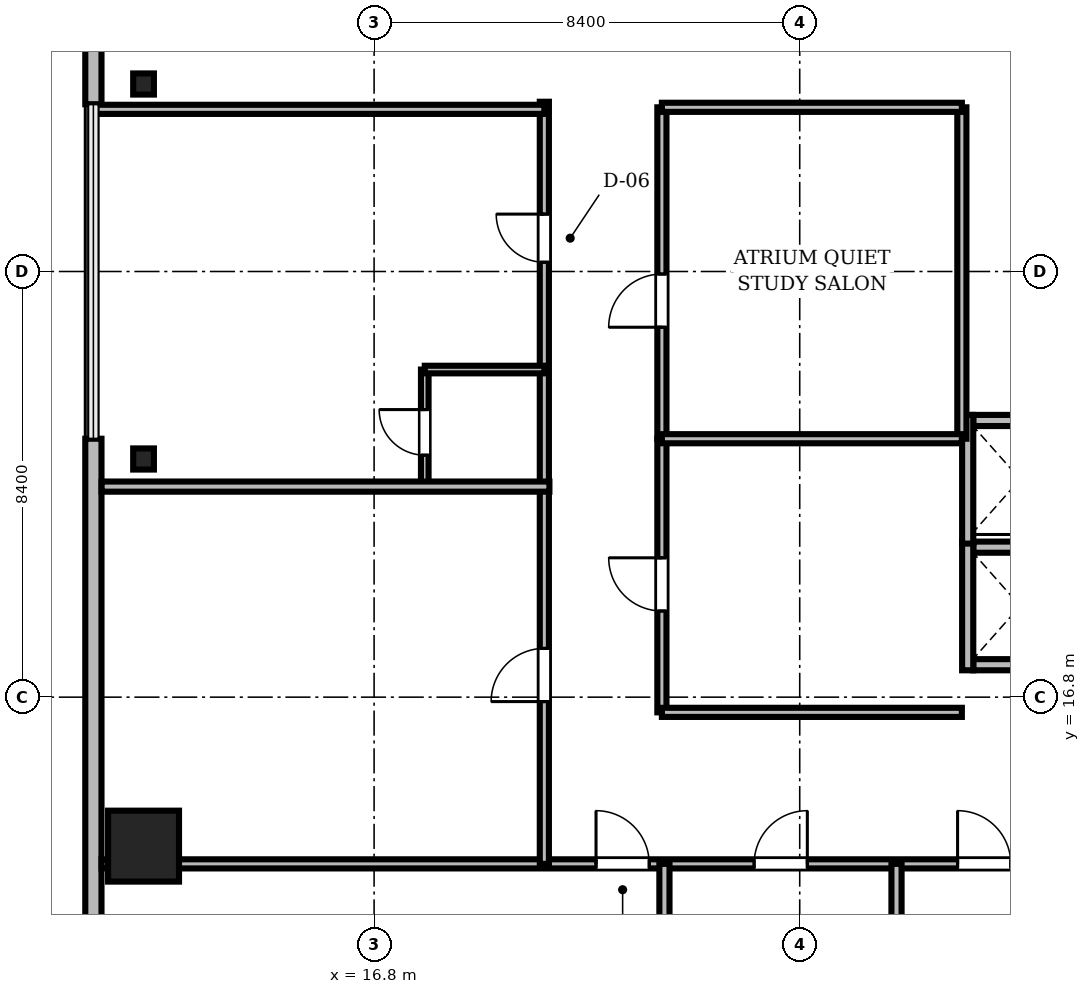
"""IFC4 building model, lengths in metres.
Left out: names, types, materials, properties, quantities, classifications, styles, units other than length and angle.
Written with IfcOpenShell. Run it as: python <this file> out.ifc"""

import sys

from ifc_helpers import new_model, si_unit, direction, frame, frame_2d, origin, origin_2d, place, context, subcontext, project, spatial, rectangle, i_section, extrude, source, transform, mapped, element, fill, save


model = new_model("IFC4")
c1 = context("Model", 3, precision=1e-05, world=origin(), true_north=direction((0.0, 1.0)))
c2 = subcontext(c1, "Body", "Model", "MODEL_VIEW")
j1 = project(units=[si_unit("LENGTHUNIT", "METRE"), si_unit("PLANEANGLEUNIT", "RADIAN")], contexts=[c1])
p1 = place(None, origin())
s1 = spatial("IfcSite", under=j1, at=p1, CompositionType="ELEMENT")
p2 = place(p1, origin())
s2 = spatial("IfcBuilding", under=s1, at=p2, CompositionType="ELEMENT")
p3 = place(p2, frame((0.0, 0.0, 181.0)))
s3 = spatial("IfcBuildingStorey", under=s2, at=p3, CompositionType="ELEMENT", Elevation=181.0)
m1 = source(origin(), c2, "Body", "SweptSolid", [
    extrude(rectangle(XDim=1.4, YDim=1.4, at=origin_2d()), origin(), (0.0, 0.0, 1.0), 3.58),
])
p4 = place(p3, frame((12.25, 13.86, 0.0), z_axis=(0.0, 0.0, 1.0), x_axis=(1.0, 0.0, 0.0)))
e1 = element("IfcColumn", 1, at=p4, inside=s3, PredefinedType="COLUMN", context=c2, shape_type="MappedRepresentation", body=[
    mapped(m1, transform((0.0, 0.0, 0.0), scale=1.0)),
])
m2 = source(origin(), c2, "Body", "SweptSolid", [
    extrude(i_section(OverallWidth=0.409, OverallDepth=0.417, WebThickness=0.021, FlangeThickness=0.033, FilletRadius=0.015, at=origin_2d()), origin(), (0.0, 0.0, 1.0), 3.58),
])
for number, where, z_axis, x_axis in (
    (2, (12.25, 28.9, 0.0), (0.0, 0.0, 1.0), (1.0, 0.0, 0.0)),
    (3, (12.25, 21.5, 0.0), (0.0, 0.0, 1.0), (1.0, 0.0, 0.0)),
):
    element("IfcColumn", number, at=place(p3, frame(where, z_axis=z_axis, x_axis=x_axis)), inside=s3, PredefinedType="COLUMN", context=c2, shape_type="MappedRepresentation", body=[
        mapped(m2, transform((0.0, 0.0, 0.0), scale=1.0)),
    ])
m3 = source(origin(), c2, "Body", "SweptSolid", [
    extrude(rectangle(XDim=15.6, YDim=0.32, at=frame_2d((7.8, 0.0))), origin(), (0.0, 0.0, 1.0), 3.58),
])
p5 = place(p3, frame((11.26, 44.1, 0.0), z_axis=(0.0, 0.0, 1.0), x_axis=(0.0, -1.0, 0.0)))
e4 = element("IfcWall", 4, at=p5, inside=s3, PredefinedType="SOLIDWALL", context=c2, shape_type="MappedRepresentation", body=[
    mapped(m3, transform((0.0, 0.0, 0.0), scale=1.0)),
])
m4 = source(origin(), c2, "Body", "SweptSolid", [
    extrude(rectangle(XDim=1.4, YDim=2.3, at=frame_2d((0.7, 1.15))), frame((0.0, 0.17, 0.0), z_axis=(0.0, -1.0, 0.0), x_axis=(1.0, 0.0, 0.0)), (0.0, 0.0, 1.0), 0.34),
])
p6 = place(p5, frame((9.61, 0.0, 0.0)))
e5 = element("IfcOpeningElement", 5, at=p6, cuts=e4, PredefinedType="OPENING", context=c2, shape_type="MappedRepresentation", body=[
    mapped(m4, transform((0.0, 0.0, 0.0), scale=1.0)),
])
m5 = source(origin(), c2, "Body", "SweptSolid", [
    extrude(rectangle(XDim=2.8, YDim=2.4, at=frame_2d((1.4, 1.2))), frame((0.0, 0.17, 0.0), z_axis=(0.0, -1.0, 0.0), x_axis=(1.0, 0.0, 0.0)), (0.0, 0.0, 1.0), 0.34),
])
p7 = place(p5, frame((2.705, 0.0, 0.72)))
e6 = element("IfcOpeningElement", 6, at=p7, cuts=e4, PredefinedType="OPENING", context=c2, shape_type="MappedRepresentation", body=[
    mapped(m5, transform((0.0, 0.0, 0.0), scale=1.0)),
])
m6 = source(origin(), c2, "Body", "SweptSolid", [
    extrude(rectangle(XDim=15.6, YDim=0.32, at=frame_2d((7.8, 0.0))), origin(), (0.0, 0.0, 1.0), 3.58),
])
p8 = place(p3, frame((11.26, 21.9, 0.0), z_axis=(0.0, 0.0, 1.0), x_axis=(0.0, -1.0, 0.0)))
e7 = element("IfcWall", 7, at=p8, inside=s3, PredefinedType="SOLIDWALL", context=c2, shape_type="MappedRepresentation", body=[
    mapped(m6, transform((0.0, 0.0, 0.0), scale=1.0)),
])
p9 = place(p8, frame((10.095, 0.0, 0.72)))
e8 = element("IfcOpeningElement", 8, at=p9, cuts=e7, PredefinedType="OPENING", context=c2, shape_type="MappedRepresentation", body=[
    mapped(m5, transform((0.0, 0.0, 0.0), scale=1.0)),
])
m7 = source(origin(), c2, "Body", "SweptSolid", [
    extrude(rectangle(XDim=1.85, YDim=0.22, at=frame_2d((0.925, 0.0))), origin(), (0.0, 0.0, 1.0), 3.022),
])
p10 = place(p3, frame((28.625, 17.44, 0.0), z_axis=(0.0, 0.0, 1.0), x_axis=(1.0, 0.0, 0.0)))
e9 = element("IfcWall", 9, at=p10, inside=s3, PredefinedType="SOLIDWALL", context=c2, shape_type="MappedRepresentation", body=[
    mapped(m7, transform((0.0, 0.0, 0.0), scale=1.0)),
])
m8 = source(origin(), c2, "Body", "SweptSolid", [
    extrude(rectangle(XDim=1.85, YDim=0.22, at=frame_2d((0.925, 0.0))), origin(), (0.0, 0.0, 1.0), 3.58),
])
p11 = place(p3, frame((28.625, 19.76, 0.0), z_axis=(0.0, 0.0, 1.0), x_axis=(1.0, 0.0, 0.0)))
e10 = element("IfcWall", 10, at=p11, inside=s3, PredefinedType="SOLIDWALL", context=c2, shape_type="MappedRepresentation", body=[
    mapped(m8, transform((0.0, 0.0, 0.0), scale=1.0)),
])
m9 = source(origin(), c2, "Body", "SweptSolid", [
    extrude(rectangle(XDim=2.54, YDim=0.22, at=frame_2d((1.27, 0.0))), origin(), (0.0, 0.0, 1.0), 3.022),
])
p12 = place(p3, frame((28.515, 17.33, 0.0), z_axis=(0.0, 0.0, 1.0), x_axis=(0.0, 1.0, 0.0)))
e11 = element("IfcWall", 11, at=p12, inside=s3, PredefinedType="SOLIDWALL", context=c2, shape_type="MappedRepresentation", body=[
    mapped(m9, transform((0.0, 0.0, 0.0), scale=1.0)),
])
p13 = place(p3, frame((28.625, 22.26, 0.0), z_axis=(0.0, 0.0, 1.0), x_axis=(1.0, 0.0, 0.0)))
e12 = element("IfcWall", 12, at=p13, inside=s3, PredefinedType="SOLIDWALL", context=c2, shape_type="MappedRepresentation", body=[
    mapped(m8, transform((0.0, 0.0, 0.0), scale=1.0)),
])
m10 = source(origin(), c2, "Body", "SweptSolid", [
    extrude(rectangle(XDim=2.54, YDim=0.22, at=frame_2d((1.27, 0.0))), origin(), (0.0, 0.0, 1.0), 3.58),
])
p14 = place(p3, frame((28.515, 19.83, 0.0), z_axis=(0.0, 0.0, 1.0), x_axis=(0.0, 1.0, 0.0)))
e13 = element("IfcWall", 13, at=p14, inside=s3, PredefinedType="SOLIDWALL", context=c2, shape_type="MappedRepresentation", body=[
    mapped(m10, transform((0.0, 0.0, 0.0), scale=1.0)),
])
m11 = source(origin(), c2, "Body", "SweptSolid", [
    extrude(rectangle(XDim=46.156, YDim=0.18, at=frame_2d((23.078, 0.0))), origin(), (0.0, 0.0, 1.0), 2.822),
])
p15 = place(p3, frame((11.422, 13.51, 0.0), z_axis=(0.0, 0.0, 1.0), x_axis=(1.0, 0.0, 0.0)))
e14 = element("IfcWall", 14, at=p15, inside=s3, PredefinedType="PARTITIONING", context=c2, shape_type="MappedRepresentation", body=[
    mapped(m11, transform((0.0, 0.0, 0.0), scale=1.0)),
])
m12 = source(origin(), c2, "Body", "SweptSolid", [
    extrude(rectangle(XDim=1.05, YDim=2.2, at=frame_2d((0.525, 1.1))), frame((0.0, 0.1, 0.0), z_axis=(0.0, -1.0, 0.0), x_axis=(1.0, 0.0, 0.0)), (0.0, 0.0, 1.0), 0.2),
])
p16 = place(p15, frame((9.758, 0.0, 0.0)))
e15 = element("IfcOpeningElement", 15, at=p16, cuts=e14, PredefinedType="OPENING", context=c2, shape_type="MappedRepresentation", body=[
    mapped(m12, transform((0.0, 0.0, 0.0), scale=1.0)),
])
p17 = place(p15, frame((12.878, 0.0, 0.0)))
e16 = element("IfcOpeningElement", 16, at=p17, cuts=e14, PredefinedType="OPENING", context=c2, shape_type="MappedRepresentation", body=[
    mapped(m12, transform((0.0, 0.0, 0.0), scale=1.0)),
])
p18 = place(p15, frame((16.893, 0.0, 0.0)))
e17 = element("IfcOpeningElement", 17, at=p18, cuts=e14, PredefinedType="OPENING", context=c2, shape_type="MappedRepresentation", body=[
    mapped(m12, transform((0.0, 0.0, 0.0), scale=1.0)),
])
p19 = place(p15, frame((20.344, 0.0, 0.0)))
e18 = element("IfcOpeningElement", 18, at=p19, cuts=e14, PredefinedType="OPENING", context=c2, shape_type="MappedRepresentation", body=[
    mapped(m12, transform((0.0, 0.0, 0.0), scale=1.0)),
])
p20 = place(p15, frame((24.008, 0.0, 0.0)))
e19 = element("IfcOpeningElement", 19, at=p20, cuts=e14, PredefinedType="OPENING", context=c2, shape_type="MappedRepresentation", body=[
    mapped(m12, transform((0.0, 0.0, 0.0), scale=1.0)),
])
p21 = place(p15, frame((28.055, 0.0, 0.0)))
e20 = element("IfcOpeningElement", 20, at=p21, cuts=e14, PredefinedType="OPENING", context=c2, shape_type="MappedRepresentation", body=[
    mapped(m12, transform((0.0, 0.0, 0.0), scale=1.0)),
])
m13 = source(origin(), c2, "Body", "SweptSolid", [
    extrude(rectangle(XDim=0.95, YDim=2.15, at=frame_2d((0.475, 1.075))), frame((0.0, 0.1, 0.0), z_axis=(0.0, -1.0, 0.0), x_axis=(1.0, 0.0, 0.0)), (0.0, 0.0, 1.0), 0.2),
])
p22 = place(p15, frame((34.246, 0.0, 0.0)))
e21 = element("IfcOpeningElement", 21, at=p22, cuts=e14, PredefinedType="OPENING", context=c2, shape_type="MappedRepresentation", body=[
    mapped(m13, transform((0.0, 0.0, 0.0), scale=1.0)),
])
p23 = place(p15, frame((37.498, 0.0, 0.0)))
e22 = element("IfcOpeningElement", 22, at=p23, cuts=e14, PredefinedType="OPENING", context=c2, shape_type="MappedRepresentation", body=[
    mapped(m12, transform((0.0, 0.0, 0.0), scale=1.0)),
])
m14 = source(origin(), c2, "Body", "SweptSolid", [
    extrude(rectangle(XDim=15.04, YDim=0.18, at=frame_2d((7.52, 0.0))), origin(), (0.0, 0.0, 1.0), 3.022),
])
p24 = place(p3, frame((20.16, 13.51, 0.0), z_axis=(0.0, 0.0, 1.0), x_axis=(0.0, 1.0, 0.0)))
e23 = element("IfcWall", 23, at=p24, inside=s3, PredefinedType="PARTITIONING", context=c2, shape_type="MappedRepresentation", body=[
    mapped(m14, transform((0.0, 0.0, 0.0), scale=1.0)),
])
p25 = place(p24, frame((3.202, 0.0, 0.0)))
e24 = element("IfcOpeningElement", 24, at=p25, cuts=e23, PredefinedType="OPENING", context=c2, shape_type="MappedRepresentation", body=[
    mapped(m12, transform((0.0, 0.0, 0.0), scale=1.0)),
])
p26 = place(p24, frame((11.873, 0.0, 0.0)))
e25 = element("IfcOpeningElement", 25, at=p26, cuts=e23, PredefinedType="OPENING", context=c2, shape_type="MappedRepresentation", body=[
    mapped(m13, transform((0.0, 0.0, 0.0), scale=1.0)),
])
m15 = source(origin(), c2, "Body", "SweptSolid", [
    extrude(rectangle(XDim=6.54, YDim=0.18, at=frame_2d((3.27, 0.0))), origin(), (0.0, 0.0, 1.0), 3.022),
])
p27 = place(p3, frame((22.48, 21.9, 0.0), z_axis=(0.0, 0.0, 1.0), x_axis=(0.0, 1.0, 0.0)))
e26 = element("IfcWall", 26, at=p27, inside=s3, PredefinedType="PARTITIONING", context=c2, shape_type="MappedRepresentation", body=[
    mapped(m15, transform((0.0, 0.0, 0.0), scale=1.0)),
])
p28 = place(p27, frame((2.2, 0.0, 0.0)))
e27 = element("IfcOpeningElement", 27, at=p28, cuts=e26, PredefinedType="OPENING", context=c2, shape_type="MappedRepresentation", body=[
    mapped(m12, transform((0.0, 0.0, 0.0), scale=1.0)),
])
m16 = source(origin(), c2, "Body", "SweptSolid", [
    extrude(rectangle(XDim=5.4, YDim=0.18, at=frame_2d((2.7, 0.0))), origin(), (0.0, 0.0, 1.0), 3.022),
])
p29 = place(p3, frame((22.48, 16.5, 0.0), z_axis=(0.0, 0.0, 1.0), x_axis=(0.0, 1.0, 0.0)))
e28 = element("IfcWall", 28, at=p29, inside=s3, PredefinedType="PARTITIONING", context=c2, shape_type="MappedRepresentation", body=[
    mapped(m16, transform((0.0, 0.0, 0.0), scale=1.0)),
])
p30 = place(p29, frame((2.0, 0.0, 0.0)))
e29 = element("IfcOpeningElement", 29, at=p30, cuts=e28, PredefinedType="OPENING", context=c2, shape_type="MappedRepresentation", body=[
    mapped(m12, transform((0.0, 0.0, 0.0), scale=1.0)),
])
m17 = source(origin(), c2, "Body", "SweptSolid", [
    extrude(rectangle(XDim=2.29, YDim=0.15, at=frame_2d((1.145, 0.0))), origin(), (0.0, 0.0, 1.0), 3.58),
])
p31 = place(p3, frame((17.8, 20.975, 0.0), z_axis=(0.0, 0.0, 1.0), x_axis=(0.0, 1.0, 0.0)))
e30 = element("IfcWall", 30, at=p31, inside=s3, PredefinedType="PARTITIONING", context=c2, shape_type="MappedRepresentation", body=[
    mapped(m17, transform((0.0, 0.0, 0.0), scale=1.0)),
])
m18 = source(origin(), c2, "Body", "SweptSolid", [
    extrude(rectangle(XDim=0.9, YDim=2.1, at=frame_2d((0.45, 1.05))), frame((0.0, 0.085, 0.0), z_axis=(0.0, -1.0, 0.0), x_axis=(1.0, 0.0, 0.0)), (0.0, 0.0, 1.0), 0.17),
])
p32 = place(p31, frame((0.6, 0.0, 0.0)))
e31 = element("IfcOpeningElement", 31, at=p32, cuts=e30, PredefinedType="OPENING", context=c2, shape_type="MappedRepresentation", body=[
    mapped(m18, transform((0.0, 0.0, 0.0), scale=1.0)),
])
m19 = source(origin(), c2, "Body", "SweptSolid", [
    extrude(rectangle(XDim=11.388, YDim=0.2, at=frame_2d((5.694, 0.0))), origin(), (0.0, 0.0, 1.0), 2.822),
])
for number, where, z_axis, x_axis in (
    (32, (22.53, 2.122, 0.0), (0.0, 0.0, 1.0), (0.0, 1.0, 0.0)),
    (33, (27.11, 2.122, 0.0), (0.0, 0.0, 1.0), (0.0, 1.0, 0.0)),
):
    element("IfcWall", number, at=place(p3, frame(where, z_axis=z_axis, x_axis=x_axis)), inside=s3, PredefinedType="PARTITIONING", context=c2, shape_type="MappedRepresentation", body=[
        mapped(m19, transform((0.0, 0.0, 0.0), scale=1.0)),
    ])
m20 = source(origin(), c2, "Body", "SweptSolid", [
    extrude(rectangle(XDim=8.838, YDim=0.2, at=frame_2d((4.419, 0.0))), origin(), (0.0, 0.0, 1.0), 2.822),
])
p33 = place(p3, frame((11.422, 20.955, 0.0), z_axis=(0.0, 0.0, 1.0), x_axis=(1.0, 0.0, 0.0)))
e34 = element("IfcWall", 34, at=p33, inside=s3, PredefinedType="PARTITIONING", context=c2, shape_type="MappedRepresentation", body=[
    mapped(m20, transform((0.0, 0.0, 0.0), scale=1.0)),
])
m21 = source(origin(), c2, "Body", "SweptSolid", [
    extrude(rectangle(XDim=8.93, YDim=0.18, at=frame_2d((4.465, 0.0))), origin(), (0.0, 0.0, 1.0), 2.822),
])
p34 = place(p3, frame((11.23, 28.4, 0.0), z_axis=(0.0, 0.0, 1.0), x_axis=(1.0, 0.0, 0.0)))
e35 = element("IfcWall", 35, at=p34, inside=s3, PredefinedType="PARTITIONING", context=c2, shape_type="MappedRepresentation", body=[
    mapped(m21, transform((0.0, 0.0, 0.0), scale=1.0)),
])
p35 = place(p3, frame((28.4, 21.9, 0.0), z_axis=(0.0, 0.0, 1.0), x_axis=(0.0, 1.0, 0.0)))
e36 = element("IfcWall", 36, at=p35, inside=s3, PredefinedType="PARTITIONING", context=c2, shape_type="MappedRepresentation", body=[
    mapped(m15, transform((0.0, 0.0, 0.0), scale=1.0)),
])
m22 = source(origin(), c2, "Body", "SweptSolid", [
    extrude(rectangle(XDim=5.92, YDim=0.18, at=frame_2d((2.96, 0.0))), origin(), (0.0, 0.0, 1.0), 3.58),
])
for number, where, z_axis, x_axis in (
    (37, (22.48, 16.5, 0.0), (0.0, 0.0, 1.0), (1.0, 0.0, 0.0)),
    (38, (22.48, 21.9, 0.0), (0.0, 0.0, 1.0), (1.0, 0.0, 0.0)),
    (39, (22.48, 28.44, 0.0), (0.0, 0.0, 1.0), (1.0, 0.0, 0.0)),
):
    element("IfcWall", number, at=place(p3, frame(where, z_axis=z_axis, x_axis=x_axis)), inside=s3, PredefinedType="PARTITIONING", context=c2, shape_type="MappedRepresentation", body=[
        mapped(m22, transform((0.0, 0.0, 0.0), scale=1.0)),
    ])
m23 = source(origin(), c2, "Body", "SweptSolid", [
    extrude(rectangle(XDim=2.36, YDim=0.15, at=frame_2d((1.18, 0.0))), origin(), (0.0, 0.0, 1.0), 3.58),
])
p36 = place(p3, frame((17.8, 23.265, 0.0), z_axis=(0.0, 0.0, 1.0), x_axis=(1.0, 0.0, 0.0)))
e40 = element("IfcWall", 40, at=p36, inside=s3, PredefinedType="PARTITIONING", context=c2, shape_type="MappedRepresentation", body=[
    mapped(m23, transform((0.0, 0.0, 0.0), scale=1.0)),
])
m24 = source(origin(), c2, "Body", "SweptSolid", [
    extrude(rectangle(XDim=1.05, YDim=2.2, at=frame_2d((0.525, 1.1))), frame((0.0, 0.025, 0.0), z_axis=(0.0, -1.0, 0.0), x_axis=(1.0, 0.0, 0.0)), (0.0, 0.0, 1.0), 0.05),
])
p37 = place(p16, origin())
e41 = element("IfcDoor", 41, at=p37, inside=s3, OperationType="SINGLE_SWING_LEFT", PredefinedType="DOOR", context=c2, shape_type="MappedRepresentation", body=[
    mapped(m24, transform((0.0, 0.0, 0.0), scale=1.0)),
])
fill(e15, e41)
p38 = place(p17, origin())
e42 = element("IfcDoor", 42, at=p38, inside=s3, OperationType="SINGLE_SWING_RIGHT", PredefinedType="DOOR", context=c2, shape_type="MappedRepresentation", body=[
    mapped(m24, transform((0.0, 0.0, 0.0), scale=1.0)),
])
fill(e16, e42)
p39 = place(p18, origin())
e43 = element("IfcDoor", 43, at=p39, inside=s3, OperationType="SINGLE_SWING_LEFT", PredefinedType="DOOR", context=c2, shape_type="MappedRepresentation", body=[
    mapped(m24, transform((0.0, 0.0, 0.0), scale=1.0)),
])
fill(e17, e43)
p40 = place(p25, origin())
e44 = element("IfcDoor", 44, at=p40, inside=s3, OperationType="SINGLE_SWING_LEFT", PredefinedType="DOOR", context=c2, shape_type="MappedRepresentation", body=[
    mapped(m24, transform((0.0, 0.0, 0.0), scale=1.0)),
])
fill(e24, e44)
m25 = source(origin(), c2, "Body", "SweptSolid", [
    extrude(rectangle(XDim=0.95, YDim=2.15, at=frame_2d((0.475, 1.075))), frame((0.0, 0.025, 0.0), z_axis=(0.0, -1.0, 0.0), x_axis=(1.0, 0.0, 0.0)), (0.0, 0.0, 1.0), 0.05),
])
p41 = place(p26, origin())
e45 = element("IfcDoor", 45, at=p41, inside=s3, OperationType="SINGLE_SWING_RIGHT", PredefinedType="DOOR", context=c2, shape_type="MappedRepresentation", body=[
    mapped(m25, transform((0.0, 0.0, 0.0), scale=1.0)),
])
fill(e25, e45)
p42 = place(p28, origin())
e46 = element("IfcDoor", 46, at=p42, inside=s3, OperationType="SINGLE_SWING_LEFT", PredefinedType="DOOR", context=c2, shape_type="MappedRepresentation", body=[
    mapped(m24, transform((0.0, 0.0, 0.0), scale=1.0)),
])
fill(e27, e46)
p43 = place(p30, origin())
e47 = element("IfcDoor", 47, at=p43, inside=s3, OperationType="SINGLE_SWING_RIGHT", PredefinedType="DOOR", context=c2, shape_type="MappedRepresentation", body=[
    mapped(m24, transform((0.0, 0.0, 0.0), scale=1.0)),
])
fill(e29, e47)
m26 = source(origin(), c2, "Body", "SweptSolid", [
    extrude(rectangle(XDim=0.9, YDim=2.1, at=frame_2d((0.45, 1.05))), frame((0.0, 0.025, 0.0), z_axis=(0.0, -1.0, 0.0), x_axis=(1.0, 0.0, 0.0)), (0.0, 0.0, 1.0), 0.05),
])
p44 = place(p32, origin())
e48 = element("IfcDoor", 48, at=p44, inside=s3, OperationType="SINGLE_SWING_RIGHT", PredefinedType="DOOR", context=c2, shape_type="MappedRepresentation", body=[
    mapped(m26, transform((0.0, 0.0, 0.0), scale=1.0)),
])
fill(e31, e48)
save(model, sys.argv[1])
